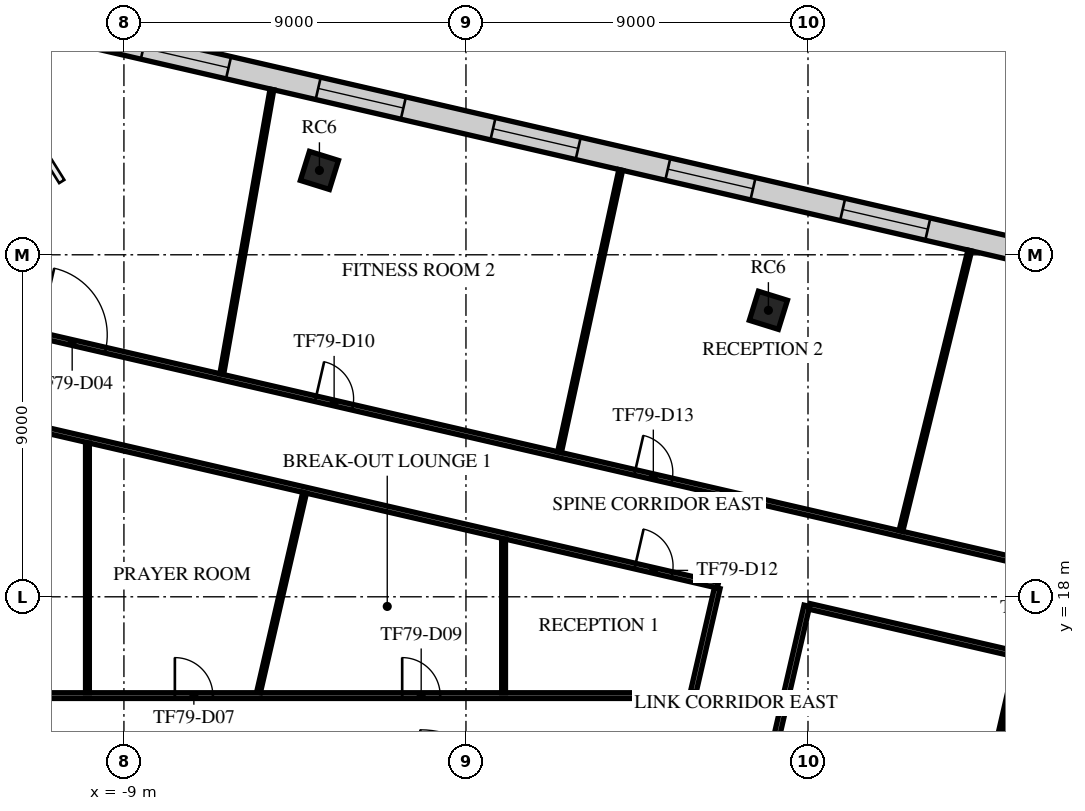
"""IFC4 building model, lengths in metres.
Left out: names, types, materials, properties, quantities, classifications, styles, units other than length and angle.
Written with IfcOpenShell. Run it as: python <this file> out.ifc"""

import sys

from ifc_helpers import new_model, si_unit, direction, frame, frame_2d, origin, origin_2d, place, context, subcontext, project, spatial, rectangle, extrude, element, fill, save


model = new_model("IFC4")
c1 = context("Model", 3, precision=1e-05, world=origin(), true_north=direction((0.0, 1.0)))
c2 = subcontext(c1, "Body", "Model", "MODEL_VIEW")
j1 = project(units=[si_unit("LENGTHUNIT", "METRE"), si_unit("PLANEANGLEUNIT", "RADIAN")], contexts=[c1])
p1 = place(None, origin())
s1 = spatial("IfcSite", under=j1, at=p1, CompositionType="ELEMENT")
p2 = place(p1, origin())
s2 = spatial("IfcBuilding", under=s1, at=p2, CompositionType="ELEMENT")
p3 = place(p2, frame((0.0, 0.0, 332.5)))
s3 = spatial("IfcBuildingStorey", under=s2, at=p3, CompositionType="ELEMENT", Elevation=332.5)
for number, where, z_axis, x_axis in (
    (1, (7.958, 25.539, 0.0), (0.0, 0.0, 1.0), (0.298, 0.955, 0.0)),
    (2, (-3.856, 29.22, 0.0), (0.0, 0.0, 1.0), (0.298, 0.955, 0.0)),
):
    element("IfcColumn", number, at=place(p3, frame(where, z_axis=z_axis, x_axis=x_axis)), inside=s3, PredefinedType="COLUMN", context=c2, shape_type="SweptSolid", body=[
        extrude(rectangle(XDim=0.8, YDim=0.8, at=origin_2d()), origin(), (0.0, 0.0, 1.0), 4.0),
    ])
p4 = place(p3, frame((27.133, 24.217, 0.0), z_axis=(0.0, 0.0, 1.0), x_axis=(-0.974371242637, 0.224945952446, 0.0)))
e3 = element("IfcWall", 3, at=p4, inside=s3, PredefinedType="STANDARD", context=c2, shape_type="SweptSolid", body=[
    extrude(rectangle(XDim=42.49, YDim=0.6, at=frame_2d((21.245, 0.0))), origin(), (0.0, 0.0, 1.0), 3.65),
])
p5 = place(p4, frame((1.21, 0.0, 0.9)))
e4 = element("IfcOpeningElement", 4, at=p5, cuts=e3, PredefinedType="OPENING", context=c2, shape_type="SweptSolid", body=[
    extrude(rectangle(XDim=2.3, YDim=2.1, at=frame_2d((1.15, 1.05))), frame((0.0, 0.31, 0.0), z_axis=(0.0, -1.0, 0.0), x_axis=(1.0, 0.0, 0.0)), (0.0, 0.0, 1.0), 0.62),
])
p6 = place(p4, frame((5.932, 0.0, 0.9)))
e5 = element("IfcOpeningElement", 5, at=p6, cuts=e3, PredefinedType="OPENING", context=c2, shape_type="SweptSolid", body=[
    extrude(rectangle(XDim=2.3, YDim=2.1, at=frame_2d((1.15, 1.05))), frame((0.0, 0.31, 0.0), z_axis=(0.0, -1.0, 0.0), x_axis=(1.0, 0.0, 0.0)), (0.0, 0.0, 1.0), 0.62),
])
p7 = place(p4, frame((10.653, 0.0, 0.9)))
e6 = element("IfcOpeningElement", 6, at=p7, cuts=e3, PredefinedType="OPENING", context=c2, shape_type="SweptSolid", body=[
    extrude(rectangle(XDim=2.3, YDim=2.1, at=frame_2d((1.15, 1.05))), frame((0.0, 0.31, 0.0), z_axis=(0.0, -1.0, 0.0), x_axis=(1.0, 0.0, 0.0)), (0.0, 0.0, 1.0), 0.62),
])
p8 = place(p4, frame((15.374, 0.0, 0.9)))
e7 = element("IfcOpeningElement", 7, at=p8, cuts=e3, PredefinedType="OPENING", context=c2, shape_type="SweptSolid", body=[
    extrude(rectangle(XDim=2.3, YDim=2.1, at=frame_2d((1.15, 1.05))), frame((0.0, 0.31, 0.0), z_axis=(0.0, -1.0, 0.0), x_axis=(1.0, 0.0, 0.0)), (0.0, 0.0, 1.0), 0.62),
])
p9 = place(p4, frame((20.095, 0.0, 0.9)))
e8 = element("IfcOpeningElement", 8, at=p9, cuts=e3, PredefinedType="OPENING", context=c2, shape_type="SweptSolid", body=[
    extrude(rectangle(XDim=2.3, YDim=2.1, at=frame_2d((1.15, 1.05))), frame((0.0, 0.31, 0.0), z_axis=(0.0, -1.0, 0.0), x_axis=(1.0, 0.0, 0.0)), (0.0, 0.0, 1.0), 0.62),
])
p10 = place(p4, frame((24.816, 0.0, 0.9)))
e9 = element("IfcOpeningElement", 9, at=p10, cuts=e3, PredefinedType="OPENING", context=c2, shape_type="SweptSolid", body=[
    extrude(rectangle(XDim=2.3, YDim=2.1, at=frame_2d((1.15, 1.05))), frame((0.0, 0.31, 0.0), z_axis=(0.0, -1.0, 0.0), x_axis=(1.0, 0.0, 0.0)), (0.0, 0.0, 1.0), 0.62),
])
p11 = place(p4, frame((29.537, 0.0, 0.9)))
e10 = element("IfcOpeningElement", 10, at=p11, cuts=e3, PredefinedType="OPENING", context=c2, shape_type="SweptSolid", body=[
    extrude(rectangle(XDim=2.3, YDim=2.1, at=frame_2d((1.15, 1.05))), frame((0.0, 0.31, 0.0), z_axis=(0.0, -1.0, 0.0), x_axis=(1.0, 0.0, 0.0)), (0.0, 0.0, 1.0), 0.62),
])
p12 = place(p4, frame((34.258, 0.0, 0.9)))
e11 = element("IfcOpeningElement", 11, at=p12, cuts=e3, PredefinedType="OPENING", context=c2, shape_type="SweptSolid", body=[
    extrude(rectangle(XDim=2.3, YDim=2.1, at=frame_2d((1.15, 1.05))), frame((0.0, 0.31, 0.0), z_axis=(0.0, -1.0, 0.0), x_axis=(1.0, 0.0, 0.0)), (0.0, 0.0, 1.0), 0.62),
])
p13 = place(p4, frame((38.979, 0.0, 0.9)))
e12 = element("IfcOpeningElement", 12, at=p13, cuts=e3, PredefinedType="OPENING", context=c2, shape_type="SweptSolid", body=[
    extrude(rectangle(XDim=2.3, YDim=2.1, at=frame_2d((1.15, 1.05))), frame((0.0, 0.31, 0.0), z_axis=(0.0, -1.0, 0.0), x_axis=(1.0, 0.0, 0.0)), (0.0, 0.0, 1.0), 0.62),
])
p14 = place(p3, frame((-15.325, 15.4, 0.0), z_axis=(0.0, 0.0, 1.0), x_axis=(1.0, 0.0, 0.0)))
e13 = element("IfcWall", 13, at=p14, inside=s3, PredefinedType="PARTITIONING", context=c2, shape_type="SweptSolid", body=[
    extrude(rectangle(XDim=21.285, YDim=0.15, at=frame_2d((10.643, 0.0))), origin(), (0.0, 0.0, 1.0), 3.25),
])
p15 = place(p14, frame((7.665, 0.0, 0.0)))
e14 = element("IfcOpeningElement", 14, at=p15, cuts=e13, PredefinedType="OPENING", context=c2, shape_type="SweptSolid", body=[
    extrude(rectangle(XDim=1.0, YDim=2.1, at=frame_2d((0.5, 1.05))), frame((0.0, 0.085, 0.0), z_axis=(0.0, -1.0, 0.0), x_axis=(1.0, 0.0, 0.0)), (0.0, 0.0, 1.0), 0.17),
])
p16 = place(p14, frame((13.647, 0.0, 0.0)))
e15 = element("IfcOpeningElement", 15, at=p16, cuts=e13, PredefinedType="OPENING", context=c2, shape_type="SweptSolid", body=[
    extrude(rectangle(XDim=1.0, YDim=2.1, at=frame_2d((0.5, 1.05))), frame((0.0, 0.085, 0.0), z_axis=(0.0, -1.0, 0.0), x_axis=(1.0, 0.0, 0.0)), (0.0, 0.0, 1.0), 0.17),
])
p17 = place(p3, frame((-12.802, 22.79, 0.0), z_axis=(0.0, 0.0, 1.0), x_axis=(0.974371384758, -0.224945336838, 0.0)))
e16 = element("IfcWall", 16, at=p17, inside=s3, PredefinedType="PARTITIONING", context=c2, shape_type="SweptSolid", body=[
    extrude(rectangle(XDim=19.943, YDim=0.15, at=frame_2d((9.972, 0.0))), origin(), (0.0, 0.0, 1.0), 3.25),
])
p18 = place(p17, frame((17.705, 0.0, 0.0)))
e17 = element("IfcOpeningElement", 17, at=p18, cuts=e16, PredefinedType="OPENING", context=c2, shape_type="SweptSolid", body=[
    extrude(rectangle(XDim=1.0, YDim=2.1, at=frame_2d((0.5, 1.05))), frame((0.0, 0.085, 0.0), z_axis=(0.0, -1.0, 0.0), x_axis=(1.0, 0.0, 0.0)), (0.0, 0.0, 1.0), 0.17),
])
p19 = place(p3, frame((-12.262, 25.129, 0.0), z_axis=(0.0, 0.0, 1.0), x_axis=(0.974366228137, -0.224967672045, 0.0)))
e18 = element("IfcWall", 18, at=p19, inside=s3, PredefinedType="PARTITIONING", context=c2, shape_type="SweptSolid", body=[
    extrude(rectangle(XDim=35.276, YDim=0.15, at=frame_2d((17.638, 0.0))), origin(), (0.0, 0.0, 1.0), 3.25),
])
p20 = place(p19, frame((1.05, 0.0, 0.0)))
e19 = element("IfcOpeningElement", 19, at=p20, cuts=e18, PredefinedType="OPENING", context=c2, shape_type="SweptSolid", body=[
    extrude(rectangle(XDim=1.8, YDim=2.1, at=frame_2d((0.9, 1.05))), frame((0.0, 0.085, 0.0), z_axis=(0.0, -1.0, 0.0), x_axis=(1.0, 0.0, 0.0)), (0.0, 0.0, 1.0), 0.17),
])
p21 = place(p19, frame((8.524, 0.0, 0.0)))
e20 = element("IfcOpeningElement", 20, at=p21, cuts=e18, PredefinedType="OPENING", context=c2, shape_type="SweptSolid", body=[
    extrude(rectangle(XDim=1.0, YDim=2.1, at=frame_2d((0.5, 1.05))), frame((0.0, 0.085, 0.0), z_axis=(0.0, -1.0, 0.0), x_axis=(1.0, 0.0, 0.0)), (0.0, 0.0, 1.0), 0.17),
])
p22 = place(p19, frame((17.144, 0.0, 0.0)))
e21 = element("IfcOpeningElement", 21, at=p22, cuts=e18, PredefinedType="OPENING", context=c2, shape_type="SweptSolid", body=[
    extrude(rectangle(XDim=1.0, YDim=2.1, at=frame_2d((0.5, 1.05))), frame((0.0, 0.085, 0.0), z_axis=(0.0, -1.0, 0.0), x_axis=(1.0, 0.0, 0.0)), (0.0, 0.0, 1.0), 0.17),
])
p23 = place(p19, frame((27.613, 0.0, 0.0)))
e22 = element("IfcOpeningElement", 22, at=p23, cuts=e18, PredefinedType="OPENING", context=c2, shape_type="SweptSolid", body=[
    extrude(rectangle(XDim=1.0, YDim=2.1, at=frame_2d((0.5, 1.05))), frame((0.0, 0.085, 0.0), z_axis=(0.0, -1.0, 0.0), x_axis=(1.0, 0.0, 0.0)), (0.0, 0.0, 1.0), 0.17),
])
p24 = place(p3, frame((5.981, 15.492, 0.0), z_axis=(0.0, 0.0, 1.0), x_axis=(0.224777043794, 0.97441022192, 0.0)))
e23 = element("IfcWall", 23, at=p24, inside=s3, PredefinedType="PARTITIONING", context=c2, shape_type="SweptSolid", body=[
    extrude(rectangle(XDim=2.811, YDim=0.15, at=frame_2d((1.406, 0.0))), origin(), (0.0, 0.0, 1.0), 3.65),
])
p25 = place(p3, frame((7.731, 12.4, 0.0), z_axis=(0.0, 0.0, 1.0), x_axis=(0.224891896022, 0.974383720668, 0.0)))
e24 = element("IfcWall", 24, at=p25, inside=s3, PredefinedType="PARTITIONING", context=c2, shape_type="SweptSolid", body=[
    extrude(rectangle(XDim=5.505, YDim=0.15, at=frame_2d((2.752, 0.0))), origin(), (0.0, 0.0, 1.0), 3.13),
])
p26 = place(p25, frame((1.05, 0.0, 0.0)))
e25 = element("IfcOpeningElement", 25, at=p26, cuts=e24, PredefinedType="OPENING", context=c2, shape_type="SweptSolid", body=[
    extrude(rectangle(XDim=1.0, YDim=2.1, at=frame_2d((0.5, 1.05))), frame((0.0, 0.085, 0.0), z_axis=(0.0, -1.0, 0.0), x_axis=(1.0, 0.0, 0.0)), (0.0, 0.0, 1.0), 0.17),
])
p27 = place(p3, frame((9.042, 17.747, 0.0), z_axis=(0.0, 0.0, 1.0), x_axis=(0.974374231644, -0.224933004931, 0.0)))
e26 = element("IfcWall", 26, at=p27, inside=s3, PredefinedType="PARTITIONING", context=c2, shape_type="SweptSolid", body=[
    extrude(rectangle(XDim=12.858, YDim=0.15, at=frame_2d((6.429, 0.0))), origin(), (0.0, 0.0, 1.0), 3.25),
])
p28 = place(p3, frame((-9.96, 15.475, 0.0), z_axis=(0.0, 0.0, 1.0), x_axis=(0.0, 1.0, 0.0)))
e27 = element("IfcWall", 27, at=p28, inside=s3, PredefinedType="PARTITIONING", context=c2, shape_type="SweptSolid", body=[
    extrude(rectangle(XDim=6.57, YDim=0.1, at=frame_2d((3.285, 0.0))), origin(), (0.0, 0.0, 1.0), 3.65),
])
p29 = place(p3, frame((-6.426, 23.862, 0.0), z_axis=(0.0, 0.0, 1.0), x_axis=(0.173571031003, 0.984821352935, 0.0)))
e28 = element("IfcWall", 28, at=p29, inside=s3, PredefinedType="PARTITIONING", context=c2, shape_type="SweptSolid", body=[
    extrude(rectangle(XDim=7.604, YDim=0.1, at=frame_2d((3.802, 0.0))), origin(), (0.0, 0.0, 1.0), 3.05),
])
p30 = place(p3, frame((-5.458, 15.486, 0.0), z_axis=(0.0, 0.0, 1.0), x_axis=(0.224899204936, 0.974382033711, 0.0)))
e29 = element("IfcWall", 29, at=p30, inside=s3, PredefinedType="PARTITIONING", context=c2, shape_type="SweptSolid", body=[
    extrude(rectangle(XDim=5.39, YDim=0.1, at=frame_2d((2.695, 0.0))), origin(), (0.0, 0.0, 1.0), 3.13),
])
p31 = place(p3, frame((0.99, 15.475, 0.0), z_axis=(0.0, 0.0, 1.0), x_axis=(0.0, 1.0, 0.0)))
e30 = element("IfcWall", 30, at=p31, inside=s3, PredefinedType="PARTITIONING", context=c2, shape_type="SweptSolid", body=[
    extrude(rectangle(XDim=4.042, YDim=0.1, at=frame_2d((2.021, 0.0))), origin(), (0.0, 0.0, 1.0), 3.65),
])
p32 = place(p3, frame((2.462, 21.807, 0.0), z_axis=(0.0, 0.0, 1.0), x_axis=(0.211973327183, 0.977275451735, 0.0)))
e31 = element("IfcWall", 31, at=p32, inside=s3, PredefinedType="PARTITIONING", context=c2, shape_type="SweptSolid", body=[
    extrude(rectangle(XDim=7.597, YDim=0.1, at=frame_2d((3.798, 0.0))), origin(), (0.0, 0.0, 1.0), 3.05),
])
p33 = place(p3, frame((11.445, 19.733, 0.0), z_axis=(0.0, 0.0, 1.0), x_axis=(0.238465178955, 0.971151048203, 0.0)))
e32 = element("IfcWall", 32, at=p33, inside=s3, PredefinedType="PARTITIONING", context=c2, shape_type="SweptSolid", body=[
    extrude(rectangle(XDim=7.597, YDim=0.1, at=frame_2d((3.798, 0.0))), origin(), (0.0, 0.0, 1.0), 3.05),
])
p34 = place(p3, frame((13.612, 12.486, 0.0), z_axis=(0.0, 0.0, 1.0), x_axis=(0.224788589714, 0.974407558435, 0.0)))
e33 = element("IfcWall", 33, at=p34, inside=s3, PredefinedType="PARTITIONING", context=c2, shape_type="SweptSolid", body=[
    extrude(rectangle(XDim=4.023, YDim=0.1, at=frame_2d((2.011, 0.0))), origin(), (0.0, 0.0, 1.0), 3.25),
])
p35 = place(p8, origin())
e34 = element("IfcWindow", 34, at=p35, inside=s3, PartitioningType="SINGLE_PANEL", PredefinedType="WINDOW", context=c2, shape_type="SweptSolid", body=[
    extrude(rectangle(XDim=2.3, YDim=2.1, at=frame_2d((1.15, 1.05))), frame((0.0, 0.03, 0.0), z_axis=(0.0, -1.0, 0.0), x_axis=(1.0, 0.0, 0.0)), (0.0, 0.0, 1.0), 0.06),
])
fill(e7, e34)
p36 = place(p9, origin())
e35 = element("IfcWindow", 35, at=p36, inside=s3, PartitioningType="SINGLE_PANEL", PredefinedType="WINDOW", context=c2, shape_type="SweptSolid", body=[
    extrude(rectangle(XDim=2.3, YDim=2.1, at=frame_2d((1.15, 1.05))), frame((0.0, 0.03, 0.0), z_axis=(0.0, -1.0, 0.0), x_axis=(1.0, 0.0, 0.0)), (0.0, 0.0, 1.0), 0.06),
])
fill(e8, e35)
p37 = place(p10, origin())
e36 = element("IfcWindow", 36, at=p37, inside=s3, PartitioningType="SINGLE_PANEL", PredefinedType="WINDOW", context=c2, shape_type="SweptSolid", body=[
    extrude(rectangle(XDim=2.3, YDim=2.1, at=frame_2d((1.15, 1.05))), frame((0.0, 0.03, 0.0), z_axis=(0.0, -1.0, 0.0), x_axis=(1.0, 0.0, 0.0)), (0.0, 0.0, 1.0), 0.06),
])
fill(e9, e36)
p38 = place(p11, origin())
e37 = element("IfcWindow", 37, at=p38, inside=s3, PartitioningType="SINGLE_PANEL", PredefinedType="WINDOW", context=c2, shape_type="SweptSolid", body=[
    extrude(rectangle(XDim=2.3, YDim=2.1, at=frame_2d((1.15, 1.05))), frame((0.0, 0.03, 0.0), z_axis=(0.0, -1.0, 0.0), x_axis=(1.0, 0.0, 0.0)), (0.0, 0.0, 1.0), 0.06),
])
fill(e10, e37)
p39 = place(p12, origin())
e38 = element("IfcWindow", 38, at=p39, inside=s3, PartitioningType="SINGLE_PANEL", PredefinedType="WINDOW", context=c2, shape_type="SweptSolid", body=[
    extrude(rectangle(XDim=2.3, YDim=2.1, at=frame_2d((1.15, 1.05))), frame((0.0, 0.03, 0.0), z_axis=(0.0, -1.0, 0.0), x_axis=(1.0, 0.0, 0.0)), (0.0, 0.0, 1.0), 0.06),
])
fill(e11, e38)
p40 = place(p20, origin())
e39 = element("IfcDoor", 39, at=p40, inside=s3, OperationType="DOUBLE_DOOR_SINGLE_SWING", PredefinedType="DOOR", context=c2, shape_type="SweptSolid", body=[
    extrude(rectangle(XDim=1.8, YDim=2.1, at=frame_2d((0.9, 1.05))), frame((0.0, 0.025, 0.0), z_axis=(0.0, -1.0, 0.0), x_axis=(1.0, 0.0, 0.0)), (0.0, 0.0, 1.0), 0.05),
])
fill(e19, e39)
p41 = place(p15, origin())
e40 = element("IfcDoor", 40, at=p41, inside=s3, OperationType="SINGLE_SWING_LEFT", PredefinedType="DOOR", context=c2, shape_type="SweptSolid", body=[
    extrude(rectangle(XDim=1.0, YDim=2.1, at=frame_2d((0.5, 1.05))), frame((0.0, 0.025, 0.0), z_axis=(0.0, -1.0, 0.0), x_axis=(1.0, 0.0, 0.0)), (0.0, 0.0, 1.0), 0.05),
])
fill(e14, e40)
p42 = place(p16, origin())
e41 = element("IfcDoor", 41, at=p42, inside=s3, OperationType="SINGLE_SWING_RIGHT", PredefinedType="DOOR", context=c2, shape_type="SweptSolid", body=[
    extrude(rectangle(XDim=1.0, YDim=2.1, at=frame_2d((0.5, 1.05))), frame((0.0, 0.025, 0.0), z_axis=(0.0, -1.0, 0.0), x_axis=(1.0, 0.0, 0.0)), (0.0, 0.0, 1.0), 0.05),
])
fill(e15, e41)
p43 = place(p21, origin())
e42 = element("IfcDoor", 42, at=p43, inside=s3, OperationType="SINGLE_SWING_RIGHT", PredefinedType="DOOR", context=c2, shape_type="SweptSolid", body=[
    extrude(rectangle(XDim=1.0, YDim=2.1, at=frame_2d((0.5, 1.05))), frame((0.0, 0.025, 0.0), z_axis=(0.0, -1.0, 0.0), x_axis=(1.0, 0.0, 0.0)), (0.0, 0.0, 1.0), 0.05),
])
fill(e20, e42)
p44 = place(p18, frame((1.0, 0.0, 0.0), z_axis=(0.0, 0.0, 1.0), x_axis=(-1.0, 0.0, 0.0)))
e43 = element("IfcDoor", 43, at=p44, inside=s3, OperationType="SINGLE_SWING_RIGHT", PredefinedType="DOOR", context=c2, shape_type="SweptSolid", body=[
    extrude(rectangle(XDim=1.0, YDim=2.1, at=frame_2d((0.5, 1.05))), frame((0.0, 0.025, 0.0), z_axis=(0.0, -1.0, 0.0), x_axis=(1.0, 0.0, 0.0)), (0.0, 0.0, 1.0), 0.05),
])
fill(e17, e43)
p45 = place(p22, origin())
e44 = element("IfcDoor", 44, at=p45, inside=s3, OperationType="SINGLE_SWING_LEFT", PredefinedType="DOOR", context=c2, shape_type="SweptSolid", body=[
    extrude(rectangle(XDim=1.0, YDim=2.1, at=frame_2d((0.5, 1.05))), frame((0.0, 0.025, 0.0), z_axis=(0.0, -1.0, 0.0), x_axis=(1.0, 0.0, 0.0)), (0.0, 0.0, 1.0), 0.05),
])
fill(e21, e44)
save(model, sys.argv[1])
